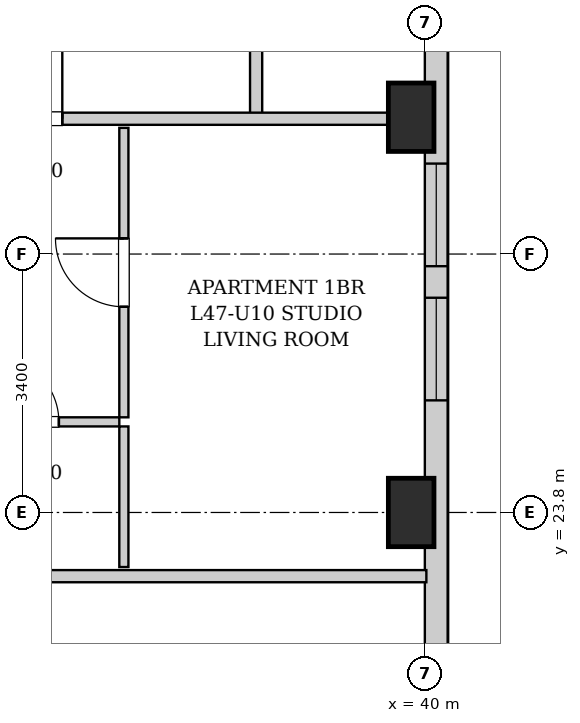
"""IFC4 building model, lengths in metres.
Left out: names, types, materials, properties, quantities, classifications, styles, units other than length and angle.
Written with IfcOpenShell. Run it as: python <this file> out.ifc"""

import sys

from ifc_helpers import new_model, si_unit, direction, frame, frame_2d, origin, origin_2d, place, context, subcontext, project, spatial, rectangle, extrude, element, fill, save


model = new_model("IFC4")
c1 = context("Model", 3, precision=1e-05, world=origin(), true_north=direction((0.0, 1.0)))
c2 = subcontext(c1, "Body", "Model", "MODEL_VIEW")
j1 = project(units=[si_unit("LENGTHUNIT", "METRE"), si_unit("PLANEANGLEUNIT", "RADIAN")], contexts=[c1])
p1 = place(None, origin())
s1 = spatial("IfcSite", under=j1, at=p1, CompositionType="ELEMENT")
p2 = place(p1, origin())
s2 = spatial("IfcBuilding", under=s1, at=p2, CompositionType="ELEMENT")
p3 = place(p2, frame((0.0, 0.0, 163.4)))
s3 = spatial("IfcBuildingStorey", under=s2, at=p3, CompositionType="ELEMENT", Elevation=163.4)
for number, where, z_axis, x_axis in (
    (1, (39.82, 23.8, 0.0), (0.0, 0.0, 1.0), (1.0, 0.0, 0.0)),
    (2, (39.82, 29.0, 0.0), (0.0, 0.0, 1.0), (1.0, 0.0, 0.0)),
):
    element("IfcColumn", number, at=place(p3, frame(where, z_axis=z_axis, x_axis=x_axis)), inside=s3, PredefinedType="COLUMN", context=c2, shape_type="SweptSolid", body=[
        extrude(rectangle(XDim=0.6, YDim=0.9, at=origin_2d()), origin(), (0.0, 0.0, 1.0), 3.25),
    ])
p4 = place(p3, frame((40.15, 40.8, 0.0), z_axis=(0.0, 0.0, 1.0), x_axis=(0.0, -1.0, 0.0)))
e3 = element("IfcWall", 3, at=p4, inside=s3, PredefinedType="SOLIDWALL", context=c2, shape_type="SweptSolid", body=[
    extrude(rectangle(XDim=34.5, YDim=0.3, at=frame_2d((17.25, 0.0))), origin(), (0.0, 0.0, 1.0), 2.99),
])
p5 = place(p4, frame((31.725, 0.0, 0.55)))
e4 = element("IfcOpeningElement", 4, at=p5, cuts=e3, PredefinedType="OPENING", context=c2, shape_type="SweptSolid", body=[
    extrude(rectangle(XDim=1.35, YDim=1.2, at=frame_2d((0.675, 0.6))), frame((0.0, 0.16, 0.0), z_axis=(0.0, -1.0, 0.0), x_axis=(1.0, 0.0, 0.0)), (0.0, 0.0, 1.0), 0.32),
])
p6 = place(p4, frame((3.0, 0.0, 0.55)))
e5 = element("IfcOpeningElement", 5, at=p6, cuts=e3, PredefinedType="OPENING", context=c2, shape_type="SweptSolid", body=[
    extrude(rectangle(XDim=1.35, YDim=1.2, at=frame_2d((0.675, 0.6))), frame((0.0, 0.16, 0.0), z_axis=(0.0, -1.0, 0.0), x_axis=(1.0, 0.0, 0.0)), (0.0, 0.0, 1.0), 0.32),
])
p7 = place(p4, frame((1.085, 0.0, 0.55)))
e6 = element("IfcOpeningElement", 6, at=p7, cuts=e3, PredefinedType="OPENING", context=c2, shape_type="SweptSolid", body=[
    extrude(rectangle(XDim=1.35, YDim=1.2, at=frame_2d((0.675, 0.6))), frame((0.0, 0.16, 0.0), z_axis=(0.0, -1.0, 0.0), x_axis=(1.0, 0.0, 0.0)), (0.0, 0.0, 1.0), 0.32),
])
p8 = place(p4, frame((21.3, 0.0, 0.55)))
e7 = element("IfcOpeningElement", 7, at=p8, cuts=e3, PredefinedType="OPENING", context=c2, shape_type="SweptSolid", body=[
    extrude(rectangle(XDim=1.35, YDim=1.2, at=frame_2d((0.675, 0.6))), frame((0.0, 0.16, 0.0), z_axis=(0.0, -1.0, 0.0), x_axis=(1.0, 0.0, 0.0)), (0.0, 0.0, 1.0), 0.32),
])
p9 = place(p4, frame((22.91, 0.0, 0.55)))
e8 = element("IfcOpeningElement", 8, at=p9, cuts=e3, PredefinedType="OPENING", context=c2, shape_type="SweptSolid", body=[
    extrude(rectangle(XDim=1.35, YDim=1.2, at=frame_2d((0.675, 0.6))), frame((0.0, 0.16, 0.0), z_axis=(0.0, -1.0, 0.0), x_axis=(1.0, 0.0, 0.0)), (0.0, 0.0, 1.0), 0.32),
])
p10 = place(p4, frame((14.175, 0.0, 0.55)))
e9 = element("IfcOpeningElement", 9, at=p10, cuts=e3, PredefinedType="OPENING", context=c2, shape_type="SweptSolid", body=[
    extrude(rectangle(XDim=1.35, YDim=1.2, at=frame_2d((0.675, 0.6))), frame((0.0, 0.16, 0.0), z_axis=(0.0, -1.0, 0.0), x_axis=(1.0, 0.0, 0.0)), (0.0, 0.0, 1.0), 0.32),
])
p11 = place(p4, frame((12.41, 0.0, 0.55)))
e10 = element("IfcOpeningElement", 10, at=p11, cuts=e3, PredefinedType="OPENING", context=c2, shape_type="SweptSolid", body=[
    extrude(rectangle(XDim=1.35, YDim=1.2, at=frame_2d((0.675, 0.6))), frame((0.0, 0.16, 0.0), z_axis=(0.0, -1.0, 0.0), x_axis=(1.0, 0.0, 0.0)), (0.0, 0.0, 1.0), 0.32),
])
p12 = place(p3, frame((37.78, 28.98, 0.0), z_axis=(0.0, 0.0, 1.0), x_axis=(0.0, 1.0, 0.0)))
e11 = element("IfcWall", 11, at=p12, inside=s3, PredefinedType="PARTITIONING", context=c2, shape_type="SweptSolid", body=[
    extrude(rectangle(XDim=1.74, YDim=0.16, at=frame_2d((0.87, 0.0))), origin(), (0.0, 0.0, 1.0), 2.99),
])
p13 = place(p3, frame((33.53, 22.962, 0.0), z_axis=(0.0, 0.0, 1.0), x_axis=(1.0, 0.0, 0.0)))
e12 = element("IfcWall", 12, at=p13, inside=s3, PredefinedType="PARTITIONING", context=c2, shape_type="SweptSolid", body=[
    extrude(rectangle(XDim=6.49, YDim=0.16, at=frame_2d((3.245, 0.0))), origin(), (0.0, 0.0, 1.0), 2.99),
])
p14 = place(p3, frame((33.38, 28.98, 0.0), z_axis=(0.0, 0.0, 1.0), x_axis=(1.0, 0.0, 0.0)))
e13 = element("IfcWall", 13, at=p14, inside=s3, PredefinedType="PARTITIONING", context=c2, shape_type="SweptSolid", body=[
    extrude(rectangle(XDim=6.64, YDim=0.16, at=frame_2d((3.32, 0.0))), origin(), (0.0, 0.0, 1.0), 2.442),
])
p15 = place(p14, frame((0.9, 0.0, 0.0)))
e14 = element("IfcOpeningElement", 14, at=p15, cuts=e13, PredefinedType="OPENING", context=c2, shape_type="SweptSolid", body=[
    extrude(rectangle(XDim=0.95, YDim=2.1, at=frame_2d((0.475, 1.05))), frame((0.0, 0.09, 0.0), z_axis=(0.0, -1.0, 0.0), x_axis=(1.0, 0.0, 0.0)), (0.0, 0.0, 1.0), 0.18),
])
p16 = place(p3, frame((33.53, 24.992, 0.0), z_axis=(0.0, 0.0, 1.0), x_axis=(1.0, 0.0, 0.0)))
e15 = element("IfcWall", 15, at=p16, inside=s3, PredefinedType="PARTITIONING", context=c2, shape_type="SweptSolid", body=[
    extrude(rectangle(XDim=2.45, YDim=0.12, at=frame_2d((1.225, 0.0))), origin(), (0.0, 0.0, 1.0), 2.99),
])
p17 = place(p16, frame((0.795, 0.0, 0.0)))
e16 = element("IfcOpeningElement", 16, at=p17, cuts=e15, PredefinedType="OPENING", context=c2, shape_type="SweptSolid", body=[
    extrude(rectangle(XDim=0.86, YDim=2.05, at=frame_2d((0.43, 1.025))), frame((0.0, 0.07, 0.0), z_axis=(0.0, -1.0, 0.0), x_axis=(1.0, 0.0, 0.0)), (0.0, 0.0, 1.0), 0.14),
])
p18 = place(p3, frame((36.04, 23.082, 0.0), z_axis=(0.0, 0.0, 1.0), x_axis=(0.0, 1.0, 0.0)))
e17 = element("IfcWall", 17, at=p18, inside=s3, PredefinedType="PARTITIONING", context=c2, shape_type="SweptSolid", body=[
    extrude(rectangle(XDim=1.85, YDim=0.12, at=frame_2d((0.925, 0.0))), origin(), (0.0, 0.0, 1.0), 2.99),
])
p19 = place(p3, frame((36.04, 25.052, 0.0), z_axis=(0.0, 0.0, 1.0), x_axis=(0.0, 1.0, 0.0)))
e18 = element("IfcWall", 18, at=p19, inside=s3, PredefinedType="PARTITIONING", context=c2, shape_type="SweptSolid", body=[
    extrude(rectangle(XDim=3.808, YDim=0.12, at=frame_2d((1.904, 0.0))), origin(), (0.0, 0.0, 1.0), 2.99),
])
p20 = place(p19, frame((1.454, 0.0, 0.0)))
e19 = element("IfcOpeningElement", 19, at=p20, cuts=e18, PredefinedType="OPENING", context=c2, shape_type="SweptSolid", body=[
    extrude(rectangle(XDim=0.9, YDim=2.05, at=frame_2d((0.45, 1.025))), frame((0.0, 0.07, 0.0), z_axis=(0.0, -1.0, 0.0), x_axis=(1.0, 0.0, 0.0)), (0.0, 0.0, 1.0), 0.14),
])
p21 = place(p15, origin())
e20 = element("IfcDoor", 20, at=p21, inside=s3, OperationType="SINGLE_SWING_RIGHT", PredefinedType="DOOR", context=c2, shape_type="SweptSolid", body=[
    extrude(rectangle(XDim=0.95, YDim=2.1, at=frame_2d((0.475, 1.05))), frame((0.0, 0.025, 0.0), z_axis=(0.0, -1.0, 0.0), x_axis=(1.0, 0.0, 0.0)), (0.0, 0.0, 1.0), 0.05),
])
fill(e14, e20)
p22 = place(p17, origin())
e21 = element("IfcDoor", 21, at=p22, inside=s3, OperationType="SINGLE_SWING_LEFT", PredefinedType="DOOR", context=c2, shape_type="SweptSolid", body=[
    extrude(rectangle(XDim=0.86, YDim=2.05, at=frame_2d((0.43, 1.025))), frame((0.0, 0.025, 0.0), z_axis=(0.0, -1.0, 0.0), x_axis=(1.0, 0.0, 0.0)), (0.0, 0.0, 1.0), 0.05),
])
fill(e16, e21)
p23 = place(p20, origin())
e22 = element("IfcDoor", 22, at=p23, inside=s3, OperationType="SINGLE_SWING_RIGHT", PredefinedType="DOOR", context=c2, shape_type="SweptSolid", body=[
    extrude(rectangle(XDim=0.9, YDim=2.05, at=frame_2d((0.45, 1.025))), frame((0.0, 0.025, 0.0), z_axis=(0.0, -1.0, 0.0), x_axis=(1.0, 0.0, 0.0)), (0.0, 0.0, 1.0), 0.05),
])
fill(e19, e22)
p24 = place(p10, origin())
e23 = element("IfcWindow", 23, at=p24, inside=s3, PartitioningType="SINGLE_PANEL", PredefinedType="WINDOW", context=c2, shape_type="SweptSolid", body=[
    extrude(rectangle(XDim=1.35, YDim=1.2, at=frame_2d((0.675, 0.6))), frame((0.0, 0.03, 0.0), z_axis=(0.0, -1.0, 0.0), x_axis=(1.0, 0.0, 0.0)), (0.0, 0.0, 1.0), 0.06),
])
fill(e9, e23)
p25 = place(p11, origin())
e24 = element("IfcWindow", 24, at=p25, inside=s3, PartitioningType="SINGLE_PANEL", PredefinedType="WINDOW", context=c2, shape_type="SweptSolid", body=[
    extrude(rectangle(XDim=1.35, YDim=1.2, at=frame_2d((0.675, 0.6))), frame((0.0, 0.03, 0.0), z_axis=(0.0, -1.0, 0.0), x_axis=(1.0, 0.0, 0.0)), (0.0, 0.0, 1.0), 0.06),
])
fill(e10, e24)
save(model, sys.argv[1])
